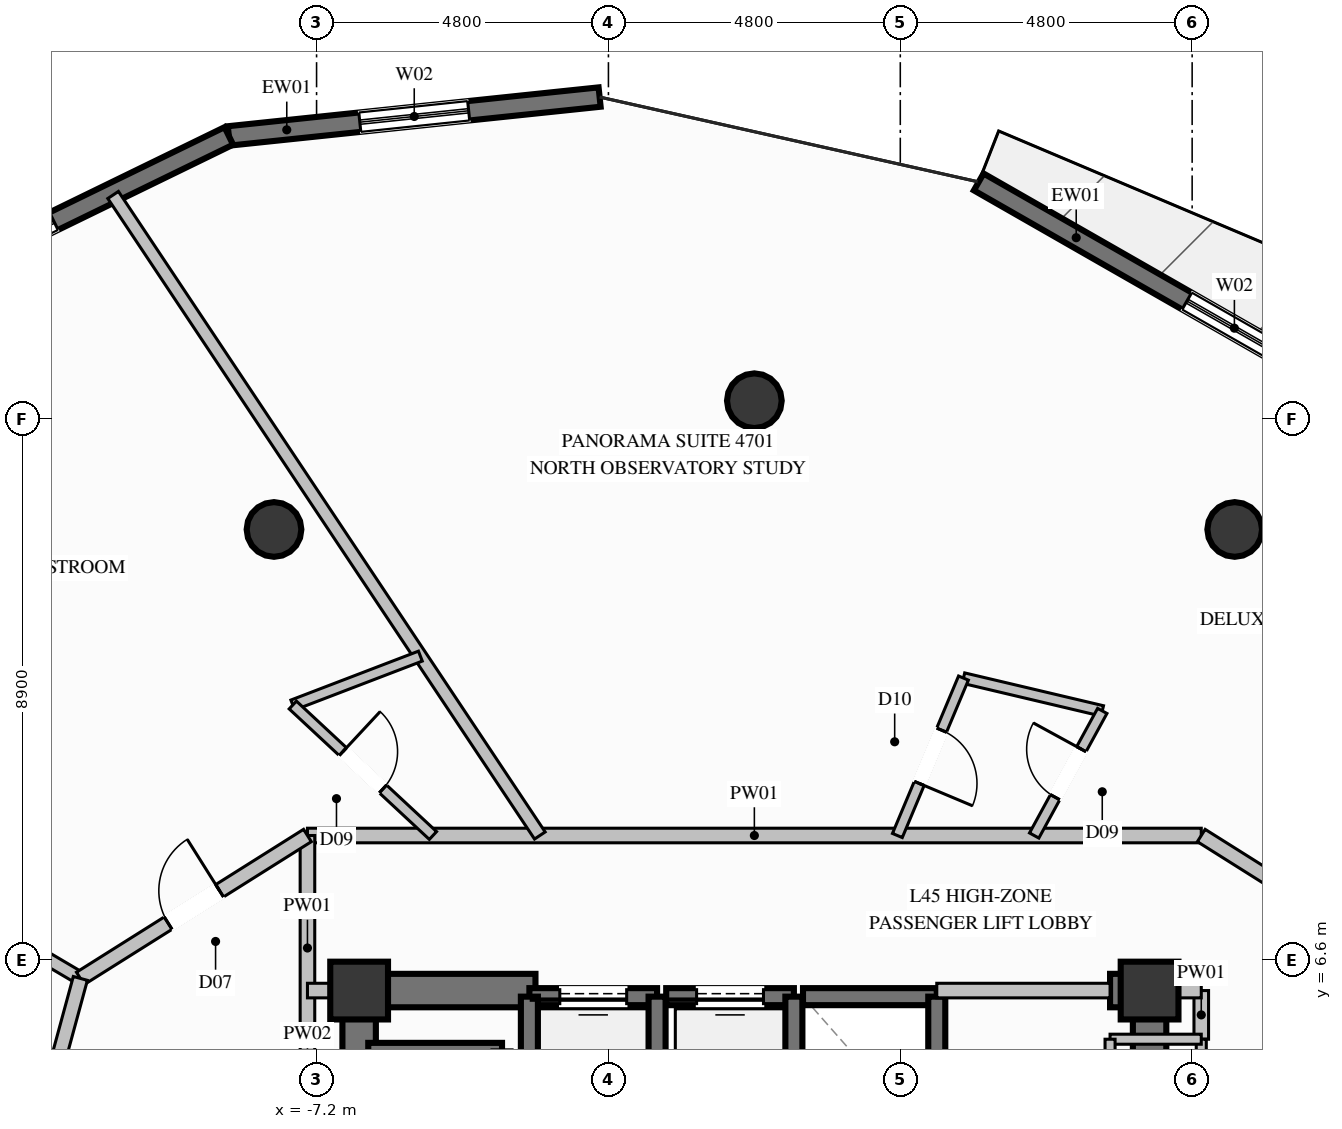
"""IFC4 building model, lengths in metres.
Left out: names, types, materials, properties, quantities, classifications, styles, units other than length and angle.
Written with IfcOpenShell. Run it as: python <this file> out.ifc"""

import sys

from ifc_helpers import new_model, si_unit, direction, frame, frame_2d, origin, origin_2d, place, context, subcontext, project, spatial, rectangle, circle, extrude, element, fill, save


model = new_model("IFC4")
c1 = context("Model", 3, precision=1e-05, world=origin(), true_north=direction((0.0, 1.0)))
c2 = subcontext(c1, "Body", "Model", "MODEL_VIEW")
j1 = project(units=[si_unit("LENGTHUNIT", "METRE"), si_unit("PLANEANGLEUNIT", "RADIAN")], contexts=[c1])
p1 = place(None, origin())
s1 = spatial("IfcSite", under=j1, at=p1, CompositionType="ELEMENT")
p2 = place(p1, origin())
s2 = spatial("IfcBuilding", under=s1, at=p2, CompositionType="ELEMENT")
p3 = place(p2, frame((0.0, 0.0, 176.8)))
s3 = spatial("IfcBuildingStorey", under=s2, at=p3, CompositionType="ELEMENT", Elevation=176.8)
for number, where, z_axis, x_axis in (
    (1, (6.5, 6.1, 0.0), (0.0, 0.0, 1.0), (1.0, 0.0, 0.0)),
    (2, (-6.5, 6.1, 0.0), (0.0, 0.0, 1.0), (1.0, 0.0, 0.0)),
):
    element("IfcColumn", number, at=place(p3, frame(where, z_axis=z_axis, x_axis=x_axis)), inside=s3, PredefinedType="COLUMN", context=c2, shape_type="SweptSolid", body=[
        extrude(rectangle(XDim=0.95, YDim=0.95, at=origin_2d()), origin(), (0.0, 0.0, 1.0), 3.6),
    ])
p4 = place(p3, frame((-6.225, 6.1, 0.0), z_axis=(0.0, 0.0, 1.0), x_axis=(1.0, 0.0, 0.0)))
e3 = element("IfcWall", 3, at=p4, inside=s3, PredefinedType="SHEAR", context=c2, shape_type="SweptSolid", body=[
    extrude(rectangle(XDim=2.625, YDim=0.55, at=frame_2d((1.312, 0.0))), origin(), (0.0, 0.0, 1.0), 3.6),
])
p5 = place(p3, frame((5.85, 6.1, 0.0), z_axis=(0.0, 0.0, 1.0), x_axis=(1.0, 0.0, 0.0)))
e4 = element("IfcWall", 4, at=p5, inside=s3, PredefinedType="SHEAR", context=c2, shape_type="SweptSolid", body=[
    extrude(rectangle(XDim=0.375, YDim=0.55, at=frame_2d((0.188, 0.0))), origin(), (0.0, 0.0, 1.0), 3.6),
])
p6 = place(p3, frame((-6.5, 2.35, 0.0), z_axis=(0.0, 0.0, 1.0), x_axis=(0.0, 1.0, 0.0)))
e5 = element("IfcWall", 5, at=p6, inside=s3, PredefinedType="SHEAR", context=c2, shape_type="SweptSolid", body=[
    extrude(rectangle(XDim=4.025, YDim=0.55, at=frame_2d((2.012, 0.0))), origin(), (0.0, 0.0, 1.0), 3.6),
])
p7 = place(p3, frame((6.5, 3.35, 0.0), z_axis=(0.0, 0.0, 1.0), x_axis=(0.0, 1.0, 0.0)))
e6 = element("IfcWall", 6, at=p7, inside=s3, PredefinedType="SHEAR", context=c2, shape_type="SweptSolid", body=[
    extrude(rectangle(XDim=3.025, YDim=0.55, at=frame_2d((1.512, 0.0))), origin(), (0.0, 0.0, 1.0), 3.6),
])
for number, where, z_axis, x_axis in (
    (7, (7.9, 13.683, 0.0), (0.0, 0.0, 1.0), (1.0, 0.0, 0.0)),
    (8, (0.0, 15.8, 0.0), (0.0, 0.0, 1.0), (1.0, 0.0, 0.0)),
    (9, (-7.9, 13.683, 0.0), (0.0, 0.0, 1.0), (1.0, 0.0, 0.0)),
):
    element("IfcColumn", number, at=place(p3, frame(where, z_axis=z_axis, x_axis=x_axis)), inside=s3, PredefinedType="COLUMN", context=c2, shape_type="SweptSolid", body=[
        extrude(circle(Radius=0.45, at=origin_2d()), origin(), (0.0, 0.0, 1.0), 3.6),
    ])
p8 = place(p3, frame((3.69, 19.398, 0.0), z_axis=(0.0, 0.0, 1.0), x_axis=(0.868052920032, -0.496471678974, 0.0)))
e10 = element("IfcWall", 10, at=p8, inside=s3, PredefinedType="SOLIDWALL", context=c2, shape_type="SweptSolid", body=[
    extrude(rectangle(XDim=6.637, YDim=0.32, at=frame_2d((3.318, 0.0))), origin(), (0.0, 0.0, 1.0), 3.36),
])
p9 = place(p8, frame((3.944, 0.0, 0.35)))
e11 = element("IfcOpeningElement", 11, at=p9, cuts=e10, PredefinedType="OPENING", context=c2, shape_type="SweptSolid", body=[
    extrude(rectangle(XDim=1.8, YDim=2.6, at=frame_2d((0.9, 1.3))), frame((0.0, 0.17, 0.0), z_axis=(0.0, -1.0, 0.0), x_axis=(1.0, 0.0, 0.0)), (0.0, 0.0, 1.0), 0.34),
])
p10 = place(p3, frame((-8.643, 20.155, 0.0), z_axis=(0.0, 0.0, 1.0), x_axis=(0.994556170884, 0.104201837585, 0.0)))
e12 = element("IfcWall", 12, at=p10, inside=s3, PredefinedType="SOLIDWALL", context=c2, shape_type="SweptSolid", body=[
    extrude(rectangle(XDim=6.132, YDim=0.32, at=frame_2d((3.066, 0.0))), origin(), (0.0, 0.0, 1.0), 3.36),
])
p11 = place(p10, frame((2.166, 0.0, 0.35)))
e13 = element("IfcOpeningElement", 13, at=p11, cuts=e12, PredefinedType="OPENING", context=c2, shape_type="SweptSolid", body=[
    extrude(rectangle(XDim=1.8, YDim=2.6, at=frame_2d((0.9, 1.3))), frame((0.0, 0.17, 0.0), z_axis=(0.0, -1.0, 0.0), x_axis=(1.0, 0.0, 0.0)), (0.0, 0.0, 1.0), 0.34),
])
p12 = place(p3, frame((-14.008, 17.542, 0.0), z_axis=(0.0, 0.0, 1.0), x_axis=(0.899034471399, 0.437877858811, 0.0)))
e14 = element("IfcWall", 14, at=p12, inside=s3, PredefinedType="SOLIDWALL", context=c2, shape_type="SweptSolid", body=[
    extrude(rectangle(XDim=5.968, YDim=0.32, at=frame_2d((2.984, 0.0))), origin(), (0.0, 0.0, 1.0), 3.36),
])
p13 = place(p12, frame((0.966, 0.0, 0.35)))
e15 = element("IfcOpeningElement", 15, at=p13, cuts=e14, PredefinedType="OPENING", context=c2, shape_type="SweptSolid", body=[
    extrude(rectangle(XDim=1.8, YDim=2.6, at=frame_2d((0.9, 1.3))), frame((0.0, 0.17, 0.0), z_axis=(0.0, -1.0, 0.0), x_axis=(1.0, 0.0, 0.0)), (0.0, 0.0, 1.0), 0.34),
])
p14 = place(p3, frame((-1.6, 6.0, 0.0), z_axis=(0.0, 0.0, 1.0), x_axis=(-1.0, 0.0, 0.0)))
e16 = element("IfcWall", 16, at=p14, inside=s3, PredefinedType="SOLIDWALL", context=c2, shape_type="SweptSolid", body=[
    extrude(rectangle(XDim=2.1, YDim=0.28, at=frame_2d((1.05, 0.0))), origin(), (0.0, 0.0, 1.0), 3.36),
])
p15 = place(p14, frame((0.5, 0.0, 0.0)))
e17 = element("IfcOpeningElement", 17, at=p15, cuts=e16, PredefinedType="OPENING", context=c2, shape_type="SweptSolid", body=[
    extrude(rectangle(XDim=1.1, YDim=2.2, at=frame_2d((0.55, 1.1))), frame((0.0, 0.15, 0.0), z_axis=(0.0, -1.0, 0.0), x_axis=(1.0, 0.0, 0.0)), (0.0, 0.0, 1.0), 0.3),
])
for number, where, z_axis, x_axis in (
    (18, (-3.7, 6.0, 0.0), (0.0, 0.0, 1.0), (0.0, -1.0, 0.0)),
    (19, (-1.6, 3.5, 0.0), (0.0, 0.0, 1.0), (0.0, 1.0, 0.0)),
):
    element("IfcWall", number, at=place(p3, frame(where, z_axis=z_axis, x_axis=x_axis)), inside=s3, PredefinedType="SOLIDWALL", context=c2, shape_type="SweptSolid", body=[
        extrude(rectangle(XDim=2.5, YDim=0.28, at=frame_2d((1.25, 0.0))), origin(), (0.0, 0.0, 1.0), 3.36),
    ])
p16 = place(p3, frame((0.65, 6.0, 0.0), z_axis=(0.0, 0.0, 1.0), x_axis=(-1.0, 0.0, 0.0)))
e20 = element("IfcWall", 20, at=p16, inside=s3, PredefinedType="SOLIDWALL", context=c2, shape_type="SweptSolid", body=[
    extrude(rectangle(XDim=2.1, YDim=0.28, at=frame_2d((1.05, 0.0))), origin(), (0.0, 0.0, 1.0), 3.36),
])
p17 = place(p16, frame((0.5, 0.0, 0.0)))
e21 = element("IfcOpeningElement", 21, at=p17, cuts=e20, PredefinedType="OPENING", context=c2, shape_type="SweptSolid", body=[
    extrude(rectangle(XDim=1.1, YDim=2.2, at=frame_2d((0.55, 1.1))), frame((0.0, 0.15, 0.0), z_axis=(0.0, -1.0, 0.0), x_axis=(1.0, 0.0, 0.0)), (0.0, 0.0, 1.0), 0.3),
])
p18 = place(p3, frame((0.65, 3.5, 0.0), z_axis=(0.0, 0.0, 1.0), x_axis=(0.0, 1.0, 0.0)))
e22 = element("IfcWall", 22, at=p18, inside=s3, PredefinedType="SOLIDWALL", context=c2, shape_type="SweptSolid", body=[
    extrude(rectangle(XDim=2.5, YDim=0.28, at=frame_2d((1.25, 0.0))), origin(), (0.0, 0.0, 1.0), 3.36),
])
p19 = place(p3, frame((3.0, 6.0, 0.0), z_axis=(0.0, 0.0, 1.0), x_axis=(-1.0, 0.0, 0.0)))
e23 = element("IfcWall", 23, at=p19, inside=s3, PredefinedType="SOLIDWALL", context=c2, shape_type="SweptSolid", body=[
    extrude(rectangle(XDim=2.2, YDim=0.28, at=frame_2d((1.1, 0.0))), origin(), (0.0, 0.0, 1.0), 3.36),
])
p20 = place(p3, frame((3.0, 3.5, 0.0), z_axis=(0.0, 0.0, 1.0), x_axis=(0.0, 1.0, 0.0)))
e24 = element("IfcWall", 24, at=p20, inside=s3, PredefinedType="SOLIDWALL", context=c2, shape_type="SweptSolid", body=[
    extrude(rectangle(XDim=2.5, YDim=0.28, at=frame_2d((1.25, 0.0))), origin(), (0.0, 0.0, 1.0), 3.36),
])
p21 = place(p3, frame((-4.15, 5.1, 0.0), z_axis=(0.0, 0.0, 1.0), x_axis=(-1.0, 0.0, 0.0)))
e25 = element("IfcWall", 25, at=p21, inside=s3, PredefinedType="SOLIDWALL", context=c2, shape_type="SweptSolid", body=[
    extrude(rectangle(XDim=2.2, YDim=0.28, at=frame_2d((1.1, 0.0))), origin(), (0.0, 0.0, 1.0), 3.36),
])
p22 = place(p3, frame((-7.35, 8.65, 0.0), z_axis=(0.0, 0.0, 1.0), x_axis=(1.0, 0.0, 0.0)))
e26 = element("IfcWall", 26, at=p22, inside=s3, PredefinedType="PARTITIONING", context=c2, shape_type="SweptSolid", body=[
    extrude(rectangle(XDim=14.7, YDim=0.24, at=frame_2d((7.35, 0.0))), origin(), (0.0, 0.0, 1.0), 3.36),
])
p23 = place(p3, frame((3.0, 6.1, 0.0), z_axis=(0.0, 0.0, 1.0), x_axis=(1.0, 0.0, 0.0)))
e27 = element("IfcWall", 27, at=p23, inside=s3, PredefinedType="PARTITIONING", context=c2, shape_type="SweptSolid", body=[
    extrude(rectangle(XDim=2.85, YDim=0.24, at=frame_2d((1.425, 0.0))), origin(), (0.0, 0.0, 1.0), 2.445),
])
p24 = place(p3, frame((7.35, 5.3, 0.0), z_axis=(0.0, 0.0, 1.0), x_axis=(0.0, 1.0, 0.0)))
e28 = element("IfcWall", 28, at=p24, inside=s3, PredefinedType="PARTITIONING", context=c2, shape_type="SweptSolid", body=[
    extrude(rectangle(XDim=0.8, YDim=0.24, at=frame_2d((0.4, 0.0))), origin(), (0.0, 0.0, 1.0), 2.445),
])
p25 = place(p3, frame((6.5, 6.1, 0.0), z_axis=(0.0, 0.0, 1.0), x_axis=(1.0, 0.0, 0.0)))
e29 = element("IfcWall", 29, at=p25, inside=s3, PredefinedType="PARTITIONING", context=c2, shape_type="SweptSolid", body=[
    extrude(rectangle(XDim=0.85, YDim=0.24, at=frame_2d((0.425, 0.0))), origin(), (0.0, 0.0, 1.0), 2.876),
])
p26 = place(p3, frame((-7.35, 4.95, 0.0), z_axis=(0.0, 0.0, 1.0), x_axis=(0.0, 1.0, 0.0)))
e30 = element("IfcWall", 30, at=p26, inside=s3, PredefinedType="PARTITIONING", context=c2, shape_type="SweptSolid", body=[
    extrude(rectangle(XDim=3.7, YDim=0.24, at=frame_2d((1.85, 0.0))), origin(), (0.0, 0.0, 1.0), 2.445),
])
p27 = place(p3, frame((-7.35, 6.1, 0.0), z_axis=(0.0, 0.0, 1.0), x_axis=(1.0, 0.0, 0.0)))
e31 = element("IfcWall", 31, at=p27, inside=s3, PredefinedType="PARTITIONING", context=c2, shape_type="SweptSolid", body=[
    extrude(rectangle(XDim=0.85, YDim=0.24, at=frame_2d((0.425, 0.0))), origin(), (0.0, 0.0, 1.0), 2.876),
])
p28 = place(p3, frame((7.35, 2.75, 0.0), z_axis=(0.0, 0.0, 1.0), x_axis=(0.0, 1.0, 0.0)))
e32 = element("IfcWall", 32, at=p28, inside=s3, PredefinedType="PARTITIONING", context=c2, shape_type="SweptSolid", body=[
    extrude(rectangle(XDim=2.55, YDim=0.165, at=frame_2d((1.275, 0.0))), origin(), (0.0, 0.0, 1.0), 3.36),
])
p29 = place(p28, frame((0.75, 0.0, 0.0)))
e33 = element("IfcOpeningElement", 33, at=p29, cuts=e32, PredefinedType="OPENING", context=c2, shape_type="SweptSolid", body=[
    extrude(rectangle(XDim=1.05, YDim=2.15, at=frame_2d((0.525, 1.075))), frame((0.0, 0.093, 0.0), z_axis=(0.0, -1.0, 0.0), x_axis=(1.0, 0.0, 0.0)), (0.0, 0.0, 1.0), 0.185),
])
p30 = place(p3, frame((7.35, 5.3, 0.0), z_axis=(0.0, 0.0, 1.0), x_axis=(-1.0, 0.0, 0.0)))
e34 = element("IfcWall", 34, at=p30, inside=s3, PredefinedType="PARTITIONING", context=c2, shape_type="SweptSolid", body=[
    extrude(rectangle(XDim=1.5, YDim=0.165, at=frame_2d((0.75, 0.0))), origin(), (0.0, 0.0, 1.0), 2.445),
])
p31 = place(p3, frame((5.85, 5.3, 0.0), z_axis=(0.0, 0.0, 1.0), x_axis=(0.0, -1.0, 0.0)))
e35 = element("IfcWall", 35, at=p31, inside=s3, PredefinedType="PARTITIONING", context=c2, shape_type="SweptSolid", body=[
    extrude(rectangle(XDim=2.55, YDim=0.165, at=frame_2d((1.275, 0.0))), origin(), (0.0, 0.0, 1.0), 2.445),
])
p32 = place(p3, frame((-11.085, 6.3, 0.0), z_axis=(0.0, 0.0, 1.0), x_axis=(-0.86133622593, 0.508035339225, 0.0)))
e36 = element("IfcWall", 36, at=p32, inside=s3, PredefinedType="PARTITIONING", context=c2, shape_type="SweptSolid", body=[
    extrude(rectangle(XDim=2.584, YDim=0.21, at=frame_2d((1.292, 0.0))), origin(), (0.0, 0.0, 1.0), 2.876),
])
p33 = place(p3, frame((3.439, 11.239, 0.0), z_axis=(0.0, 0.0, 1.0), x_axis=(0.973143510765, -0.230199277704, 0.0)))
e37 = element("IfcWall", 37, at=p33, inside=s3, PredefinedType="PLUMBINGWALL", context=c2, shape_type="SweptSolid", body=[
    extrude(rectangle(XDim=2.346, YDim=0.175, at=frame_2d((1.173, 0.0))), origin(), (0.0, 0.0, 1.0), 3.36),
])
p34 = place(p3, frame((3.439, 11.239, 0.0), z_axis=(0.0, 0.0, 1.0), x_axis=(-0.387077273479, -0.922047278807, 0.0)))
e38 = element("IfcWall", 38, at=p34, inside=s3, PredefinedType="PLUMBINGWALL", context=c2, shape_type="SweptSolid", body=[
    extrude(rectangle(XDim=2.808, YDim=0.175, at=frame_2d((1.404, 0.0))), origin(), (0.0, 0.0, 1.0), 3.36),
])
p35 = place(p34, frame((0.929, 0.0, 0.0)))
e39 = element("IfcOpeningElement", 39, at=p35, cuts=e38, PredefinedType="OPENING", context=c2, shape_type="SweptSolid", body=[
    extrude(rectangle(XDim=0.95, YDim=2.1, at=frame_2d((0.475, 1.05))), frame((0.0, 0.098, 0.0), z_axis=(0.0, -1.0, 0.0), x_axis=(1.0, 0.0, 0.0)), (0.0, 0.0, 1.0), 0.195),
])
p36 = place(p3, frame((4.602, 8.65, 0.0), z_axis=(0.0, 0.0, 1.0), x_axis=(0.479577167617, 0.877499709573, 0.0)))
e40 = element("IfcWall", 40, at=p36, inside=s3, PredefinedType="PLUMBINGWALL", context=c2, shape_type="SweptSolid", body=[
    extrude(rectangle(XDim=2.335, YDim=0.175, at=frame_2d((1.167, 0.0))), origin(), (0.0, 0.0, 1.0), 3.36),
])
p37 = place(p36, frame((0.718, 0.0, 0.0)))
e41 = element("IfcOpeningElement", 41, at=p37, cuts=e40, PredefinedType="OPENING", context=c2, shape_type="SweptSolid", body=[
    extrude(rectangle(XDim=0.9, YDim=2.1, at=frame_2d((0.45, 1.05))), frame((0.0, 0.098, 0.0), z_axis=(0.0, -1.0, 0.0), x_axis=(1.0, 0.0, 0.0)), (0.0, 0.0, 1.0), 0.195),
])
p38 = place(p3, frame((7.35, 8.65, 0.0), z_axis=(0.0, 0.0, 1.0), x_axis=(0.846409267484, -0.532532958526, 0.0)))
e42 = element("IfcWall", 42, at=p38, inside=s3, PredefinedType="PARTITIONING", context=c2, shape_type="SweptSolid", body=[
    extrude(rectangle(XDim=4.413, YDim=0.24, at=frame_2d((2.206, 0.0))), origin(), (0.0, 0.0, 1.0), 3.36),
])
p39 = place(p38, frame((1.706, 0.0, 0.0)))
e43 = element("IfcOpeningElement", 43, at=p39, cuts=e42, PredefinedType="OPENING", context=c2, shape_type="SweptSolid", body=[
    extrude(rectangle(XDim=1.0, YDim=2.2, at=frame_2d((0.5, 1.1))), frame((0.0, 0.13, 0.0), z_axis=(0.0, -1.0, 0.0), x_axis=(1.0, 0.0, 0.0)), (0.0, 0.0, 1.0), 0.26),
])
p40 = place(p3, frame((-3.528, 8.65, 0.0), z_axis=(0.0, 0.0, 1.0), x_axis=(-0.554428653403, 0.832231258898, 0.0)))
e44 = element("IfcWall", 44, at=p40, inside=s3, PredefinedType="PARTITIONING", context=c2, shape_type="SweptSolid", body=[
    extrude(rectangle(XDim=12.658, YDim=0.21, at=frame_2d((6.329, 0.0))), origin(), (0.0, 0.0, 1.0), 3.36),
])
p41 = place(p3, frame((-7.591, 10.796, 0.0), z_axis=(0.0, 0.0, 1.0), x_axis=(0.933759431782, 0.357901276273, 0.0)))
e45 = element("IfcWall", 45, at=p41, inside=s3, PredefinedType="PLUMBINGWALL", context=c2, shape_type="SweptSolid", body=[
    extrude(rectangle(XDim=2.247, YDim=0.175, at=frame_2d((1.124, 0.0))), origin(), (0.0, 0.0, 1.0), 3.36),
])
p42 = place(p3, frame((-7.591, 10.796, 0.0), z_axis=(0.0, 0.0, 1.0), x_axis=(0.731925968359, -0.681384162453, 0.0)))
e46 = element("IfcWall", 46, at=p42, inside=s3, PredefinedType="PLUMBINGWALL", context=c2, shape_type="SweptSolid", body=[
    extrude(rectangle(XDim=3.149, YDim=0.175, at=frame_2d((1.575, 0.0))), origin(), (0.0, 0.0, 1.0), 3.36),
])
p43 = place(p42, frame((1.125, 0.0, 0.0)))
e47 = element("IfcOpeningElement", 47, at=p43, cuts=e46, PredefinedType="OPENING", context=c2, shape_type="SweptSolid", body=[
    extrude(rectangle(XDim=0.9, YDim=2.1, at=frame_2d((0.45, 1.05))), frame((0.0, 0.098, 0.0), z_axis=(0.0, -1.0, 0.0), x_axis=(1.0, 0.0, 0.0)), (0.0, 0.0, 1.0), 0.195),
])
p44 = place(p3, frame((-11.085, 6.3, 0.0), z_axis=(0.0, 0.0, 1.0), x_axis=(0.846409267484, 0.532532958526, 0.0)))
e48 = element("IfcWall", 48, at=p44, inside=s3, PredefinedType="PARTITIONING", context=c2, shape_type="SweptSolid", body=[
    extrude(rectangle(XDim=4.413, YDim=0.24, at=frame_2d((2.206, 0.0))), origin(), (0.0, 0.0, 1.0), 3.36),
])
p45 = place(p44, frame((1.706, 0.0, 0.0)))
e49 = element("IfcOpeningElement", 49, at=p45, cuts=e48, PredefinedType="OPENING", context=c2, shape_type="SweptSolid", body=[
    extrude(rectangle(XDim=1.0, YDim=2.2, at=frame_2d((0.5, 1.1))), frame((0.0, 0.13, 0.0), z_axis=(0.0, -1.0, 0.0), x_axis=(1.0, 0.0, 0.0)), (0.0, 0.0, 1.0), 0.26),
])
p46 = place(p3, frame((-11.085, 6.3, 0.0), z_axis=(0.0, 0.0, 1.0), x_axis=(-0.262552356383, -0.964917747872, 0.0)))
e50 = element("IfcWall", 50, at=p46, inside=s3, PredefinedType="PARTITIONING", context=c2, shape_type="SweptSolid", body=[
    extrude(rectangle(XDim=2.742, YDim=0.24, at=frame_2d((1.371, 0.0))), origin(), (0.0, 0.0, 1.0), 3.36),
])
p47 = place(p9, origin())
e51 = element("IfcWindow", 51, at=p47, inside=s3, PartitioningType="SINGLE_PANEL", PredefinedType="WINDOW", context=c2, shape_type="SweptSolid", body=[
    extrude(rectangle(XDim=1.8, YDim=2.6, at=frame_2d((0.9, 1.3))), frame((0.0, 0.03, 0.0), z_axis=(0.0, -1.0, 0.0), x_axis=(1.0, 0.0, 0.0)), (0.0, 0.0, 1.0), 0.06),
])
fill(e11, e51)
p48 = place(p11, origin())
e52 = element("IfcWindow", 52, at=p48, inside=s3, PartitioningType="SINGLE_PANEL", PredefinedType="WINDOW", context=c2, shape_type="SweptSolid", body=[
    extrude(rectangle(XDim=1.8, YDim=2.6, at=frame_2d((0.9, 1.3))), frame((0.0, 0.03, 0.0), z_axis=(0.0, -1.0, 0.0), x_axis=(1.0, 0.0, 0.0)), (0.0, 0.0, 1.0), 0.06),
])
fill(e13, e52)
p49 = place(p13, origin())
e53 = element("IfcWindow", 53, at=p49, inside=s3, PartitioningType="SINGLE_PANEL", PredefinedType="WINDOW", context=c2, shape_type="SweptSolid", body=[
    extrude(rectangle(XDim=1.8, YDim=2.6, at=frame_2d((0.9, 1.3))), frame((0.0, 0.03, 0.0), z_axis=(0.0, -1.0, 0.0), x_axis=(1.0, 0.0, 0.0)), (0.0, 0.0, 1.0), 0.06),
])
fill(e15, e53)
p50 = place(p15, origin())
e54 = element("IfcDoor", 54, at=p50, inside=s3, OperationType="SLIDING_TO_LEFT", PredefinedType="DOOR", context=c2, shape_type="SweptSolid", body=[
    extrude(rectangle(XDim=1.1, YDim=2.2, at=frame_2d((0.55, 1.1))), frame((0.0, 0.025, 0.0), z_axis=(0.0, -1.0, 0.0), x_axis=(1.0, 0.0, 0.0)), (0.0, 0.0, 1.0), 0.05),
])
fill(e17, e54)
p51 = place(p17, origin())
e55 = element("IfcDoor", 55, at=p51, inside=s3, OperationType="SLIDING_TO_LEFT", PredefinedType="DOOR", context=c2, shape_type="SweptSolid", body=[
    extrude(rectangle(XDim=1.1, YDim=2.2, at=frame_2d((0.55, 1.1))), frame((0.0, 0.025, 0.0), z_axis=(0.0, -1.0, 0.0), x_axis=(1.0, 0.0, 0.0)), (0.0, 0.0, 1.0), 0.05),
])
fill(e21, e55)
p52 = place(p37, origin())
e56 = element("IfcDoor", 56, at=p52, inside=s3, OperationType="SINGLE_SWING_RIGHT", PredefinedType="DOOR", context=c2, shape_type="SweptSolid", body=[
    extrude(rectangle(XDim=0.9, YDim=2.1, at=frame_2d((0.45, 1.05))), frame((0.0, 0.025, 0.0), z_axis=(0.0, -1.0, 0.0), x_axis=(1.0, 0.0, 0.0)), (0.0, 0.0, 1.0), 0.05),
])
fill(e41, e56)
p53 = place(p35, origin())
e57 = element("IfcDoor", 57, at=p53, inside=s3, OperationType="SINGLE_SWING_RIGHT", PredefinedType="DOOR", context=c2, shape_type="SweptSolid", body=[
    extrude(rectangle(XDim=0.95, YDim=2.1, at=frame_2d((0.475, 1.05))), frame((0.0, 0.025, 0.0), z_axis=(0.0, -1.0, 0.0), x_axis=(1.0, 0.0, 0.0)), (0.0, 0.0, 1.0), 0.05),
])
fill(e39, e57)
p54 = place(p43, origin())
e58 = element("IfcDoor", 58, at=p54, inside=s3, OperationType="SINGLE_SWING_LEFT", PredefinedType="DOOR", context=c2, shape_type="SweptSolid", body=[
    extrude(rectangle(XDim=0.9, YDim=2.1, at=frame_2d((0.45, 1.05))), frame((0.0, 0.025, 0.0), z_axis=(0.0, -1.0, 0.0), x_axis=(1.0, 0.0, 0.0)), (0.0, 0.0, 1.0), 0.05),
])
fill(e47, e58)
p55 = place(p45, origin())
e59 = element("IfcDoor", 59, at=p55, inside=s3, OperationType="SINGLE_SWING_RIGHT", PredefinedType="DOOR", context=c2, shape_type="SweptSolid", body=[
    extrude(rectangle(XDim=1.0, YDim=2.2, at=frame_2d((0.5, 1.1))), frame((0.0, 0.025, 0.0), z_axis=(0.0, -1.0, 0.0), x_axis=(1.0, 0.0, 0.0)), (0.0, 0.0, 1.0), 0.05),
])
fill(e49, e59)
save(model, sys.argv[1])
